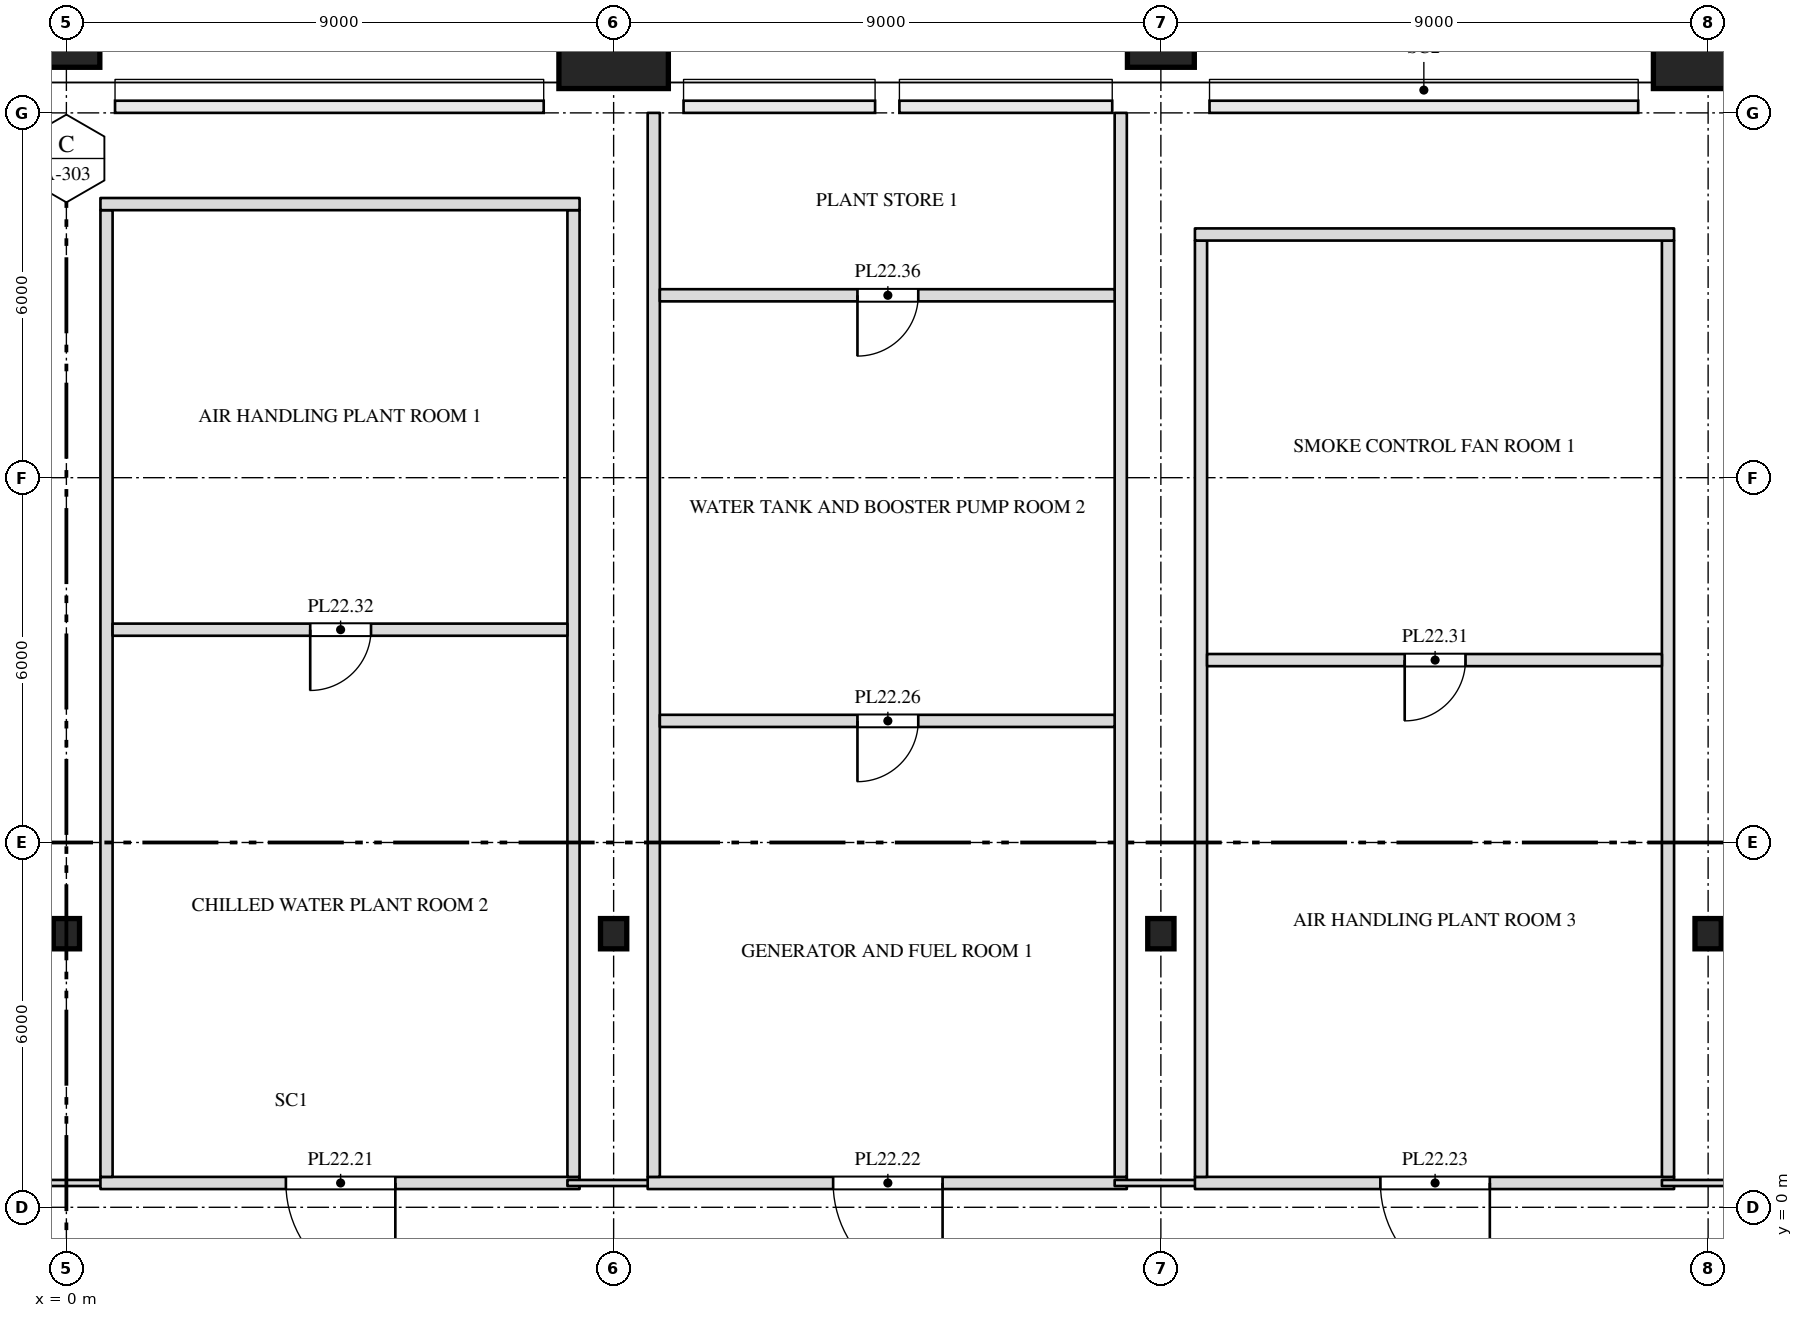
"""IFC4 building model, lengths in metres.
Left out: names, types, materials, properties, quantities, classifications, styles, units other than length and angle.
Written with IfcOpenShell. Run it as: python <this file> out.ifc"""

import sys

from ifc_helpers import new_model, si_unit, direction, frame, frame_2d, origin, origin_2d, place, context, subcontext, project, spatial, rectangle, i_section, extrude, clip, halfspace, element, fill, save


model = new_model("IFC4")
c1 = context("Model", 3, precision=1e-05, world=origin(), true_north=direction((0.0, 1.0)))
c2 = subcontext(c1, "Body", "Model", "MODEL_VIEW")
j1 = project(units=[si_unit("LENGTHUNIT", "METRE"), si_unit("PLANEANGLEUNIT", "RADIAN")], contexts=[c1])
p1 = place(None, origin())
s1 = spatial("IfcSite", under=j1, at=p1, CompositionType="ELEMENT")
p2 = place(p1, origin())
s2 = spatial("IfcBuilding", under=s1, at=p2, CompositionType="ELEMENT")
p3 = place(p2, frame((0.0, 0.0, 104.5)))
s3 = spatial("IfcBuildingStorey", under=s2, at=p3, CompositionType="ELEMENT", Elevation=104.5)
for number, where, z_axis, x_axis in (
    (1, (0.0, 4.5, 0.0), (0.0, 0.0, 1.0), (1.0, 0.0, 0.0)),
    (2, (9.0, 4.5, 0.0), (0.0, 0.0, 1.0), (1.0, 0.0, 0.0)),
    (3, (18.0, 4.5, 0.0), (0.0, 0.0, 1.0), (1.0, 0.0, 0.0)),
    (4, (27.0, 4.5, 0.0), (0.0, 0.0, 1.0), (1.0, 0.0, 0.0)),
):
    element("IfcColumn", number, at=place(p3, frame(where, z_axis=z_axis, x_axis=x_axis)), inside=s3, PredefinedType="COLUMN", context=c2, shape_type="SweptSolid", body=[
        extrude(i_section(OverallWidth=0.432, OverallDepth=0.498, WebThickness=0.056, FlangeThickness=0.089, at=origin_2d()), origin(), (0.0, 0.0, 1.0), 4.0),
    ])
p4 = place(p3, frame((0.0, 19.0, 0.0), z_axis=(0.0, 0.242535625036, 0.970142500145), x_axis=(-1.0, 0.0, 0.0)))
e5 = element("IfcColumn", 5, at=p4, inside=s3, PredefinedType="COLUMN", context=c2, shape_type="Clipping", body=[
    clip(extrude(rectangle(XDim=1.1, YDim=1.1, at=origin_2d()), origin(), (0.0, 0.0, 1.0), 4.123), halfspace(frame((0.0, 0.0, 3.986)), False)),
])
p5 = place(p3, frame((9.0, 19.0, 0.0), z_axis=(0.0, 0.242535625036, 0.970142500145), x_axis=(-1.0, 0.0, 0.0)))
e6 = element("IfcColumn", 6, at=p5, inside=s3, PredefinedType="COLUMN", context=c2, shape_type="Clipping", body=[
    clip(extrude(rectangle(XDim=1.8, YDim=1.8, at=origin_2d()), origin(), (0.0, 0.0, 1.0), 4.123), halfspace(frame((0.0, 0.0, 3.898)), False)),
])
p6 = place(p3, frame((18.0, 19.0, 0.0), z_axis=(0.0, 0.242535625036, 0.970142500145), x_axis=(-1.0, 0.0, 0.0)))
e7 = element("IfcColumn", 7, at=p6, inside=s3, PredefinedType="COLUMN", context=c2, shape_type="Clipping", body=[
    clip(extrude(rectangle(XDim=1.1, YDim=1.1, at=origin_2d()), origin(), (0.0, 0.0, 1.0), 4.123), halfspace(frame((0.0, 0.0, 3.986)), False)),
])
p7 = place(p3, frame((27.0, 19.0, 0.0), z_axis=(0.0, 0.242535625036, 0.970142500145), x_axis=(-1.0, 0.0, 0.0)))
e8 = element("IfcColumn", 8, at=p7, inside=s3, PredefinedType="COLUMN", context=c2, shape_type="Clipping", body=[
    clip(extrude(rectangle(XDim=1.8, YDim=1.8, at=origin_2d()), origin(), (0.0, 0.0, 1.0), 4.123), halfspace(frame((0.0, 0.0, 3.898)), False)),
])
p8 = place(p3, frame((-0.76, 0.4, 0.0), z_axis=(0.0, 0.0, 1.0), x_axis=(1.0, 0.0, 0.0)))
e9 = element("IfcWall", 9, at=p8, inside=s3, PredefinedType="PARTITIONING", context=c2, shape_type="SweptSolid", body=[
    extrude(rectangle(XDim=1.52, YDim=0.1, at=frame_2d((0.76, 0.0))), origin(), (0.0, 0.0, 1.0), 3.8),
])
p9 = place(p3, frame((0.56, 0.4, 0.0), z_axis=(0.0, 0.0, 1.0), x_axis=(1.0, 0.0, 0.0)))
e10 = element("IfcWall", 10, at=p9, inside=s3, PredefinedType="PARTITIONING", context=c2, shape_type="SweptSolid", body=[
    extrude(rectangle(XDim=7.88, YDim=0.2, at=frame_2d((3.94, 0.0))), origin(), (0.0, 0.0, 1.0), 3.8),
])
p10 = place(p9, frame((3.05, 0.0, 0.0)))
e11 = element("IfcOpeningElement", 11, at=p10, cuts=e10, PredefinedType="OPENING", context=c2, shape_type="SweptSolid", body=[
    extrude(rectangle(XDim=1.8, YDim=2.1, at=frame_2d((0.9, 1.05))), frame((0.0, 0.112, 0.0), z_axis=(0.0, -1.0, 0.0), x_axis=(1.0, 0.0, 0.0)), (0.0, 0.0, 1.0), 0.224),
])
p11 = place(p3, frame((0.66, 0.5, 0.0), z_axis=(0.0, 0.0, 1.0), x_axis=(0.0, 1.0, 0.0)))
e12 = element("IfcWall", 12, at=p11, inside=s3, PredefinedType="PARTITIONING", context=c2, shape_type="SweptSolid", body=[
    extrude(rectangle(XDim=15.9, YDim=0.2, at=frame_2d((7.95, 0.0))), origin(), (0.0, 0.0, 1.0), 3.8),
])
p12 = place(p3, frame((8.24, 0.4, 0.0), z_axis=(0.0, 0.0, 1.0), x_axis=(1.0, 0.0, 0.0)))
e13 = element("IfcWall", 13, at=p12, inside=s3, PredefinedType="PARTITIONING", context=c2, shape_type="SweptSolid", body=[
    extrude(rectangle(XDim=1.52, YDim=0.1, at=frame_2d((0.76, 0.0))), origin(), (0.0, 0.0, 1.0), 3.8),
])
p13 = place(p3, frame((8.34, 0.5, 0.0), z_axis=(0.0, 0.0, 1.0), x_axis=(0.0, 1.0, 0.0)))
e14 = element("IfcWall", 14, at=p13, inside=s3, PredefinedType="PARTITIONING", context=c2, shape_type="SweptSolid", body=[
    extrude(rectangle(XDim=15.9, YDim=0.2, at=frame_2d((7.95, 0.0))), origin(), (0.0, 0.0, 1.0), 3.8),
])
p14 = place(p3, frame((9.56, 0.4, 0.0), z_axis=(0.0, 0.0, 1.0), x_axis=(1.0, 0.0, 0.0)))
e15 = element("IfcWall", 15, at=p14, inside=s3, PredefinedType="PARTITIONING", context=c2, shape_type="SweptSolid", body=[
    extrude(rectangle(XDim=7.88, YDim=0.2, at=frame_2d((3.94, 0.0))), origin(), (0.0, 0.0, 1.0), 3.8),
])
p15 = place(p14, frame((3.05, 0.0, 0.0)))
e16 = element("IfcOpeningElement", 16, at=p15, cuts=e15, PredefinedType="OPENING", context=c2, shape_type="SweptSolid", body=[
    extrude(rectangle(XDim=1.8, YDim=2.1, at=frame_2d((0.9, 1.05))), frame((0.0, 0.112, 0.0), z_axis=(0.0, -1.0, 0.0), x_axis=(1.0, 0.0, 0.0)), (0.0, 0.0, 1.0), 0.224),
])
p16 = place(p3, frame((9.66, 0.5, 0.0), z_axis=(0.0, 0.0, 1.0), x_axis=(0.0, 1.0, 0.0)))
e17 = element("IfcWall", 17, at=p16, inside=s3, PredefinedType="PARTITIONING", context=c2, shape_type="SweptSolid", body=[
    extrude(rectangle(XDim=17.5, YDim=0.2, at=frame_2d((8.75, 0.0))), origin(), (0.0, 0.0, 1.0), 3.8),
])
p17 = place(p3, frame((17.24, 0.4, 0.0), z_axis=(0.0, 0.0, 1.0), x_axis=(1.0, 0.0, 0.0)))
e18 = element("IfcWall", 18, at=p17, inside=s3, PredefinedType="PARTITIONING", context=c2, shape_type="SweptSolid", body=[
    extrude(rectangle(XDim=1.52, YDim=0.1, at=frame_2d((0.76, 0.0))), origin(), (0.0, 0.0, 1.0), 3.8),
])
p18 = place(p3, frame((17.34, 0.5, 0.0), z_axis=(0.0, 0.0, 1.0), x_axis=(0.0, 1.0, 0.0)))
e19 = element("IfcWall", 19, at=p18, inside=s3, PredefinedType="PARTITIONING", context=c2, shape_type="SweptSolid", body=[
    extrude(rectangle(XDim=17.5, YDim=0.2, at=frame_2d((8.75, 0.0))), origin(), (0.0, 0.0, 1.0), 3.8),
])
p19 = place(p3, frame((18.56, 0.4, 0.0), z_axis=(0.0, 0.0, 1.0), x_axis=(1.0, 0.0, 0.0)))
e20 = element("IfcWall", 20, at=p19, inside=s3, PredefinedType="PARTITIONING", context=c2, shape_type="SweptSolid", body=[
    extrude(rectangle(XDim=7.88, YDim=0.2, at=frame_2d((3.94, 0.0))), origin(), (0.0, 0.0, 1.0), 3.8),
])
p20 = place(p19, frame((3.05, 0.0, 0.0)))
e21 = element("IfcOpeningElement", 21, at=p20, cuts=e20, PredefinedType="OPENING", context=c2, shape_type="SweptSolid", body=[
    extrude(rectangle(XDim=1.8, YDim=2.1, at=frame_2d((0.9, 1.05))), frame((0.0, 0.112, 0.0), z_axis=(0.0, -1.0, 0.0), x_axis=(1.0, 0.0, 0.0)), (0.0, 0.0, 1.0), 0.224),
])
p21 = place(p3, frame((18.66, 0.5, 0.0), z_axis=(0.0, 0.0, 1.0), x_axis=(0.0, 1.0, 0.0)))
e22 = element("IfcWall", 22, at=p21, inside=s3, PredefinedType="PARTITIONING", context=c2, shape_type="SweptSolid", body=[
    extrude(rectangle(XDim=15.4, YDim=0.2, at=frame_2d((7.7, 0.0))), origin(), (0.0, 0.0, 1.0), 3.8),
])
p22 = place(p3, frame((26.24, 0.4, 0.0), z_axis=(0.0, 0.0, 1.0), x_axis=(1.0, 0.0, 0.0)))
e23 = element("IfcWall", 23, at=p22, inside=s3, PredefinedType="PARTITIONING", context=c2, shape_type="SweptSolid", body=[
    extrude(rectangle(XDim=1.435, YDim=0.1, at=frame_2d((0.718, 0.0))), origin(), (0.0, 0.0, 1.0), 3.8),
])
p23 = place(p3, frame((26.34, 0.5, 0.0), z_axis=(0.0, 0.0, 1.0), x_axis=(0.0, 1.0, 0.0)))
e24 = element("IfcWall", 24, at=p23, inside=s3, PredefinedType="PARTITIONING", context=c2, shape_type="SweptSolid", body=[
    extrude(rectangle(XDim=15.4, YDim=0.2, at=frame_2d((7.7, 0.0))), origin(), (0.0, 0.0, 1.0), 3.8),
])
p24 = place(p3, frame((9.76, 8.0, 0.0), z_axis=(0.0, 0.0, 1.0), x_axis=(1.0, 0.0, 0.0)))
e25 = element("IfcWall", 25, at=p24, inside=s3, PredefinedType="PARTITIONING", context=c2, shape_type="SweptSolid", body=[
    extrude(rectangle(XDim=7.48, YDim=0.2, at=frame_2d((3.74, 0.0))), origin(), (0.0, 0.0, 1.0), 3.8),
])
p25 = place(p24, frame((3.25, 0.0, 0.0)))
e26 = element("IfcOpeningElement", 26, at=p25, cuts=e25, PredefinedType="OPENING", context=c2, shape_type="SweptSolid", body=[
    extrude(rectangle(XDim=1.0, YDim=2.1, at=frame_2d((0.5, 1.05))), frame((0.0, 0.112, 0.0), z_axis=(0.0, -1.0, 0.0), x_axis=(1.0, 0.0, 0.0)), (0.0, 0.0, 1.0), 0.224),
])
p26 = place(p3, frame((18.76, 9.0, 0.0), z_axis=(0.0, 0.0, 1.0), x_axis=(1.0, 0.0, 0.0)))
e27 = element("IfcWall", 27, at=p26, inside=s3, PredefinedType="PARTITIONING", context=c2, shape_type="SweptSolid", body=[
    extrude(rectangle(XDim=7.48, YDim=0.2, at=frame_2d((3.74, 0.0))), origin(), (0.0, 0.0, 1.0), 3.8),
])
p27 = place(p26, frame((3.25, 0.0, 0.0)))
e28 = element("IfcOpeningElement", 28, at=p27, cuts=e27, PredefinedType="OPENING", context=c2, shape_type="SweptSolid", body=[
    extrude(rectangle(XDim=1.0, YDim=2.1, at=frame_2d((0.5, 1.05))), frame((0.0, 0.112, 0.0), z_axis=(0.0, -1.0, 0.0), x_axis=(1.0, 0.0, 0.0)), (0.0, 0.0, 1.0), 0.224),
])
p28 = place(p3, frame((0.76, 9.5, 0.0), z_axis=(0.0, 0.0, 1.0), x_axis=(1.0, 0.0, 0.0)))
e29 = element("IfcWall", 29, at=p28, inside=s3, PredefinedType="PARTITIONING", context=c2, shape_type="SweptSolid", body=[
    extrude(rectangle(XDim=7.48, YDim=0.2, at=frame_2d((3.74, 0.0))), origin(), (0.0, 0.0, 1.0), 3.8),
])
p29 = place(p28, frame((3.25, 0.0, 0.0)))
e30 = element("IfcOpeningElement", 30, at=p29, cuts=e29, PredefinedType="OPENING", context=c2, shape_type="SweptSolid", body=[
    extrude(rectangle(XDim=1.0, YDim=2.1, at=frame_2d((0.5, 1.05))), frame((0.0, 0.112, 0.0), z_axis=(0.0, -1.0, 0.0), x_axis=(1.0, 0.0, 0.0)), (0.0, 0.0, 1.0), 0.224),
])
p30 = place(p3, frame((9.76, 15.0, 0.0), z_axis=(0.0, 0.0, 1.0), x_axis=(1.0, 0.0, 0.0)))
e31 = element("IfcWall", 31, at=p30, inside=s3, PredefinedType="PARTITIONING", context=c2, shape_type="SweptSolid", body=[
    extrude(rectangle(XDim=7.48, YDim=0.2, at=frame_2d((3.74, 0.0))), origin(), (0.0, 0.0, 1.0), 3.8),
])
p31 = place(p30, frame((3.25, 0.0, 0.0)))
e32 = element("IfcOpeningElement", 32, at=p31, cuts=e31, PredefinedType="OPENING", context=c2, shape_type="SweptSolid", body=[
    extrude(rectangle(XDim=1.0, YDim=2.1, at=frame_2d((0.5, 1.05))), frame((0.0, 0.112, 0.0), z_axis=(0.0, -1.0, 0.0), x_axis=(1.0, 0.0, 0.0)), (0.0, 0.0, 1.0), 0.224),
])
for number, where, z_axis, x_axis in (
    (33, (18.56, 16.0, 0.0), (0.0, 0.0, 1.0), (1.0, 0.0, 0.0)),
    (34, (0.56, 16.5, 0.0), (0.0, 0.0, 1.0), (1.0, 0.0, 0.0)),
):
    element("IfcWall", number, at=place(p3, frame(where, z_axis=z_axis, x_axis=x_axis)), inside=s3, PredefinedType="PARTITIONING", context=c2, shape_type="SweptSolid", body=[
        extrude(rectangle(XDim=7.88, YDim=0.2, at=frame_2d((3.94, 0.0))), origin(), (0.0, 0.0, 1.0), 3.8),
    ])
p32 = place(p10, origin())
e35 = element("IfcDoor", 35, at=p32, inside=s3, OperationType="DOUBLE_DOOR_SINGLE_SWING", PredefinedType="DOOR", context=c2, shape_type="SweptSolid", body=[
    extrude(rectangle(XDim=1.8, YDim=2.1, at=frame_2d((0.9, 1.05))), frame((0.0, 0.025, 0.0), z_axis=(0.0, -1.0, 0.0), x_axis=(1.0, 0.0, 0.0)), (0.0, 0.0, 1.0), 0.05),
])
fill(e11, e35)
p33 = place(p15, origin())
e36 = element("IfcDoor", 36, at=p33, inside=s3, OperationType="DOUBLE_DOOR_SINGLE_SWING", PredefinedType="DOOR", context=c2, shape_type="SweptSolid", body=[
    extrude(rectangle(XDim=1.8, YDim=2.1, at=frame_2d((0.9, 1.05))), frame((0.0, 0.025, 0.0), z_axis=(0.0, -1.0, 0.0), x_axis=(1.0, 0.0, 0.0)), (0.0, 0.0, 1.0), 0.05),
])
fill(e16, e36)
p34 = place(p20, origin())
e37 = element("IfcDoor", 37, at=p34, inside=s3, OperationType="DOUBLE_DOOR_SINGLE_SWING", PredefinedType="DOOR", context=c2, shape_type="SweptSolid", body=[
    extrude(rectangle(XDim=1.8, YDim=2.1, at=frame_2d((0.9, 1.05))), frame((0.0, 0.025, 0.0), z_axis=(0.0, -1.0, 0.0), x_axis=(1.0, 0.0, 0.0)), (0.0, 0.0, 1.0), 0.05),
])
fill(e21, e37)
p35 = place(p25, origin())
e38 = element("IfcDoor", 38, at=p35, inside=s3, OperationType="SINGLE_SWING_RIGHT", PredefinedType="DOOR", context=c2, shape_type="SweptSolid", body=[
    extrude(rectangle(XDim=1.0, YDim=2.1, at=frame_2d((0.5, 1.05))), frame((0.0, 0.025, 0.0), z_axis=(0.0, -1.0, 0.0), x_axis=(1.0, 0.0, 0.0)), (0.0, 0.0, 1.0), 0.05),
])
fill(e26, e38)
p36 = place(p27, origin())
e39 = element("IfcDoor", 39, at=p36, inside=s3, OperationType="SINGLE_SWING_RIGHT", PredefinedType="DOOR", context=c2, shape_type="SweptSolid", body=[
    extrude(rectangle(XDim=1.0, YDim=2.1, at=frame_2d((0.5, 1.05))), frame((0.0, 0.025, 0.0), z_axis=(0.0, -1.0, 0.0), x_axis=(1.0, 0.0, 0.0)), (0.0, 0.0, 1.0), 0.05),
])
fill(e28, e39)
p37 = place(p29, origin())
e40 = element("IfcDoor", 40, at=p37, inside=s3, OperationType="SINGLE_SWING_RIGHT", PredefinedType="DOOR", context=c2, shape_type="SweptSolid", body=[
    extrude(rectangle(XDim=1.0, YDim=2.1, at=frame_2d((0.5, 1.05))), frame((0.0, 0.025, 0.0), z_axis=(0.0, -1.0, 0.0), x_axis=(1.0, 0.0, 0.0)), (0.0, 0.0, 1.0), 0.05),
])
fill(e30, e40)
p38 = place(p31, origin())
e41 = element("IfcDoor", 41, at=p38, inside=s3, OperationType="SINGLE_SWING_RIGHT", PredefinedType="DOOR", context=c2, shape_type="SweptSolid", body=[
    extrude(rectangle(XDim=1.0, YDim=2.1, at=frame_2d((0.5, 1.05))), frame((0.0, 0.025, 0.0), z_axis=(0.0, -1.0, 0.0), x_axis=(1.0, 0.0, 0.0)), (0.0, 0.0, 1.0), 0.05),
])
fill(e32, e41)
save(model, sys.argv[1])
